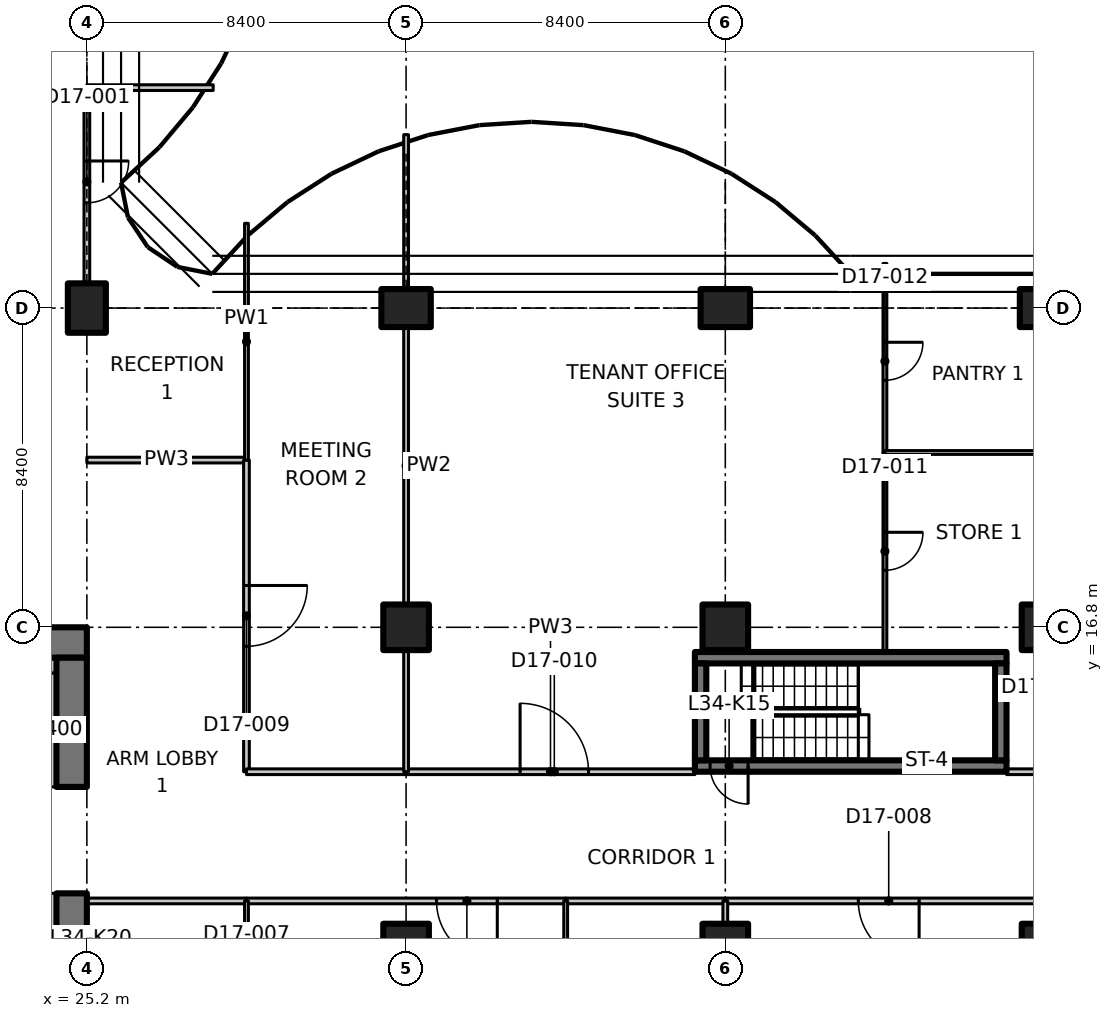
"""IFC4 building model, lengths in metres.
Left out: names, types, materials, properties, quantities, classifications, styles, units other than length and angle.
Written with IfcOpenShell. Run it as: python <this file> out.ifc"""

import sys

from ifc_helpers import new_model, si_unit, direction, frame, frame_2d, origin, origin_2d, place, context, subcontext, project, spatial, polyline, rectangle, outline, extrude, element, fill, save


model = new_model("IFC4")
c1 = context("Model", 3, precision=1e-05, world=origin(), true_north=direction((0.0, 1.0)))
c2 = subcontext(c1, "Body", "Model", "MODEL_VIEW")
j1 = project(units=[si_unit("LENGTHUNIT", "METRE"), si_unit("PLANEANGLEUNIT", "RADIAN")], contexts=[c1])
p1 = place(None, origin())
s1 = spatial("IfcSite", under=j1, at=p1, CompositionType="ELEMENT")
p2 = place(p1, origin())
s2 = spatial("IfcBuilding", under=s1, at=p2, CompositionType="ELEMENT")
p3 = place(p2, frame((0.0, 0.0, 138.5)))
s3 = spatial("IfcBuildingStorey", under=s2, at=p3, CompositionType="ELEMENT", Elevation=138.5)
p4 = place(p3, frame((25.2, 25.2, 0.0), z_axis=(0.0, 0.0, 1.0), x_axis=(1.0, 0.0, 0.0)))
e1 = element("IfcColumn", 1, at=p4, inside=s3, PredefinedType="COLUMN", context=c2, shape_type="SweptSolid", body=[
    extrude(rectangle(XDim=1.0, YDim=1.3, at=origin_2d()), origin(), (0.0, 0.0, 1.0), 3.35),
])
for number, where, z_axis, x_axis in (
    (2, (33.6, 8.4, 0.0), (0.0, 0.0, 1.0), (1.0, 0.0, 0.0)),
    (3, (33.6, 16.8, 0.0), (0.0, 0.0, 1.0), (1.0, 0.0, 0.0)),
):
    element("IfcColumn", number, at=place(p3, frame(where, z_axis=z_axis, x_axis=x_axis)), inside=s3, PredefinedType="COLUMN", context=c2, shape_type="SweptSolid", body=[
        extrude(rectangle(XDim=1.2, YDim=1.2, at=origin_2d()), origin(), (0.0, 0.0, 1.0), 3.35),
    ])
p5 = place(p3, frame((33.6, 25.2, 0.0), z_axis=(0.0, 0.0, 1.0), x_axis=(0.0, 1.0, 0.0)))
e4 = element("IfcColumn", 4, at=p5, inside=s3, PredefinedType="COLUMN", context=c2, shape_type="SweptSolid", body=[
    extrude(rectangle(XDim=1.0, YDim=1.3, at=origin_2d()), origin(), (0.0, 0.0, 1.0), 3.35),
])
for number, where, z_axis, x_axis in (
    (5, (42.0, 8.4, 0.0), (0.0, 0.0, 1.0), (1.0, 0.0, 0.0)),
    (6, (42.0, 16.8, 0.0), (0.0, 0.0, 1.0), (1.0, 0.0, 0.0)),
):
    element("IfcColumn", number, at=place(p3, frame(where, z_axis=z_axis, x_axis=x_axis)), inside=s3, PredefinedType="COLUMN", context=c2, shape_type="SweptSolid", body=[
        extrude(rectangle(XDim=1.2, YDim=1.2, at=origin_2d()), origin(), (0.0, 0.0, 1.0), 3.35),
    ])
p6 = place(p3, frame((42.0, 25.2, 0.0), z_axis=(0.0, 0.0, 1.0), x_axis=(0.0, 1.0, 0.0)))
e7 = element("IfcColumn", 7, at=p6, inside=s3, PredefinedType="COLUMN", context=c2, shape_type="SweptSolid", body=[
    extrude(rectangle(XDim=1.0, YDim=1.3, at=origin_2d()), origin(), (0.0, 0.0, 1.0), 3.35),
])
for number, where, z_axis, x_axis in (
    (8, (50.4, 8.4, 0.0), (0.0, 0.0, 1.0), (1.0, 0.0, 0.0)),
    (9, (50.4, 16.8, 0.0), (0.0, 0.0, 1.0), (1.0, 0.0, 0.0)),
):
    element("IfcColumn", number, at=place(p3, frame(where, z_axis=z_axis, x_axis=x_axis)), inside=s3, PredefinedType="COLUMN", context=c2, shape_type="SweptSolid", body=[
        extrude(rectangle(XDim=1.2, YDim=1.2, at=origin_2d()), origin(), (0.0, 0.0, 1.0), 3.35),
    ])
p7 = place(p3, frame((50.4, 25.2, 0.0), z_axis=(0.0, 0.0, 1.0), x_axis=(0.0, 1.0, 0.0)))
e10 = element("IfcColumn", 10, at=p7, inside=s3, PredefinedType="COLUMN", context=c2, shape_type="SweptSolid", body=[
    extrude(rectangle(XDim=1.0, YDim=1.3, at=origin_2d()), origin(), (0.0, 0.0, 1.0), 3.35),
])
p8 = place(p3, frame((23.8, 16.4, 0.0), z_axis=(0.0, 0.0, 1.0), x_axis=(1.0, 0.0, 0.0)))
e11 = element("IfcWall", 11, at=p8, inside=s3, PredefinedType="SHEAR", context=c2, shape_type="SweptSolid", body=[
    extrude(rectangle(XDim=1.4, YDim=0.8, at=frame_2d((0.7, 0.0))), origin(), (0.0, 0.0, 1.0), 3.35),
])
p9 = place(p3, frame((24.8, 0.8, 0.0), z_axis=(0.0, 0.0, 1.0), x_axis=(0.0, 1.0, 0.0)))
e12 = element("IfcWall", 12, at=p9, inside=s3, PredefinedType="SHEAR", context=c2, shape_type="SweptSolid", body=[
    extrude(rectangle(XDim=9.0, YDim=0.8, at=frame_2d((4.5, 0.0))), origin(), (0.0, 0.0, 1.0), 3.35),
])
p10 = place(p3, frame((24.8, 12.6, 0.0), z_axis=(0.0, 0.0, 1.0), x_axis=(0.0, 1.0, 0.0)))
e13 = element("IfcWall", 13, at=p10, inside=s3, PredefinedType="SHEAR", context=c2, shape_type="SweptSolid", body=[
    extrude(rectangle(XDim=3.4, YDim=0.8, at=frame_2d((1.7, 0.0))), origin(), (0.0, 0.0, 1.0), 3.35),
])
p11 = place(p3, frame((24.2, 12.6, 0.0), z_axis=(0.0, 0.0, 1.0), x_axis=(0.0, 1.0, 0.0)))
e14 = element("IfcWall", 14, at=p11, inside=s3, PredefinedType="PARTITIONING", context=c2, shape_type="SweptSolid", body=[
    extrude(rectangle(XDim=3.0, YDim=0.4, at=frame_2d((1.5, 0.0))), origin(), (0.0, 0.0, 1.0), 3.35),
])
p12 = place(p3, frame((23.8, 15.8, 0.0), z_axis=(0.0, 0.0, 1.0), x_axis=(1.0, 0.0, 0.0)))
e15 = element("IfcWall", 15, at=p12, inside=s3, PredefinedType="PARTITIONING", context=c2, shape_type="SweptSolid", body=[
    extrude(rectangle(XDim=0.6, YDim=0.4, at=frame_2d((0.3, 0.0))), origin(), (0.0, 0.0, 1.0), 3.35),
])
p13 = place(p3, frame((49.4, 13.15, 0.0), z_axis=(0.0, 0.0, 1.0), x_axis=(-1.0, 0.0, 0.0)))
e16 = element("IfcWall", 16, at=p13, inside=s3, PredefinedType="SHEAR", context=c2, shape_type="SweptSolid", body=[
    extrude(rectangle(XDim=8.2, YDim=0.3, at=frame_2d((4.1, 0.0))), origin(), (0.0, 0.0, 1.0), 3.35),
])
p14 = place(p13, frame((6.8, 0.0, 0.0)))
e17 = element("IfcOpeningElement", 17, at=p14, cuts=e16, PredefinedType="OPENING", context=c2, shape_type="SweptSolid", body=[
    extrude(rectangle(XDim=1.0, YDim=2.1, at=frame_2d((0.5, 1.05))), frame((0.0, 0.16, 0.0), z_axis=(0.0, -1.0, 0.0), x_axis=(1.0, 0.0, 0.0)), (0.0, 0.0, 1.0), 0.32),
])
p15 = place(p3, frame((41.2, 16.0, 0.0), z_axis=(0.0, 0.0, 1.0), x_axis=(1.0, 0.0, 0.0)))
e18 = element("IfcWall", 18, at=p15, inside=s3, PredefinedType="SHEAR", context=c2, shape_type="SweptSolid", body=[
    extrude(rectangle(XDim=8.2, YDim=0.3, at=frame_2d((4.1, 0.0))), origin(), (0.0, 0.0, 1.0), 3.35),
])
for number, where, z_axis, x_axis in (
    (19, (41.35, 13.3, 0.0), (0.0, 0.0, 1.0), (0.0, 1.0, 0.0)),
    (20, (49.25, 13.3, 0.0), (0.0, 0.0, 1.0), (0.0, 1.0, 0.0)),
):
    element("IfcWall", number, at=place(p3, frame(where, z_axis=z_axis, x_axis=x_axis)), inside=s3, PredefinedType="SHEAR", context=c2, shape_type="SweptSolid", body=[
        extrude(rectangle(XDim=2.55, YDim=0.3, at=frame_2d((1.275, 0.0))), origin(), (0.0, 0.0, 1.0), 3.35),
    ])
p16 = place(p3, frame((24.2, 4.35, 0.0), z_axis=(0.0, 0.0, 1.0), x_axis=(0.0, 1.0, 0.0)))
e21 = element("IfcWall", 21, at=p16, inside=s3, PredefinedType="PARTITIONING", context=c2, shape_type="SweptSolid", body=[
    extrude(rectangle(XDim=5.45, YDim=0.4, at=frame_2d((2.725, 0.0))), origin(), (0.0, 0.0, 1.0), 3.35),
])
for number, where, z_axis, x_axis in (
    (22, (25.2, 21.2, 0.0), (0.0, 0.0, 1.0), (1.0, 0.0, 0.0)),
    (23, (29.4, 9.6, 0.0), (0.0, 0.0, 1.0), (-1.0, 0.0, 0.0)),
):
    element("IfcWall", number, at=place(p3, frame(where, z_axis=z_axis, x_axis=x_axis)), inside=s3, PredefinedType="PARTITIONING", context=c2, shape_type="SweptSolid", body=[
        extrude(rectangle(XDim=4.2, YDim=0.15, at=frame_2d((2.1, 0.0))), origin(), (0.0, 0.0, 1.0), 3.33),
    ])
p17 = place(p3, frame((29.4, 21.2, 0.0), z_axis=(0.0, 0.0, 1.0), x_axis=(0.0, -1.0, 0.0)))
e24 = element("IfcWall", 24, at=p17, inside=s3, PredefinedType="PARTITIONING", context=c2, shape_type="SweptSolid", body=[
    extrude(rectangle(XDim=8.2, YDim=0.15, at=frame_2d((4.1, 0.0))), origin(), (0.0, 0.0, 1.0), 3.33),
])
p18 = place(p17, frame((3.3, 0.0, 0.0)))
e25 = element("IfcOpeningElement", 25, at=p18, cuts=e24, PredefinedType="OPENING", context=c2, shape_type="SweptSolid", body=[
    extrude(rectangle(XDim=1.6, YDim=2.1, at=frame_2d((0.8, 1.05))), frame((0.0, 0.085, 0.0), z_axis=(0.0, -1.0, 0.0), x_axis=(1.0, 0.0, 0.0)), (0.0, 0.0, 1.0), 0.17),
])
p19 = place(p3, frame((29.4, 27.429, 0.0), z_axis=(0.0, 0.0, 1.0), x_axis=(0.0, -1.0, 0.0)))
e26 = element("IfcWall", 26, at=p19, inside=s3, PredefinedType="PARTITIONING", context=c2, shape_type="SweptSolid", body=[
    extrude(outline(polyline([(0.0, 0.0), (6.229, 0.0), (6.229, 3.33), (2.679, 3.33), (2.677, 2.98), (1.781, 2.98), (1.779, 3.33), (0.154, 3.33), (0.0, 3.33), (0.0, 0.0)])), frame((0.0, 0.05, 0.0), z_axis=(0.0, -1.0, 0.0), x_axis=(1.0, 0.0, 0.0)), (0.0, 0.0, 1.0), 0.1),
])
p20 = place(p3, frame((25.2, 31.0, 0.0), z_axis=(0.0, 0.0, 1.0), x_axis=(0.0, -1.0, 0.0)))
e27 = element("IfcWall", 27, at=p20, inside=s3, PredefinedType="PARTITIONING", context=c2, shape_type="SweptSolid", body=[
    extrude(outline(polyline([(0.0, 0.0), (5.13, 0.0), (5.13, 2.98), (0.0, 2.98), (0.0, 0.0)])), frame((0.0, 0.075, 0.0), z_axis=(0.0, -1.0, 0.0), x_axis=(1.0, 0.0, 0.0)), (0.0, 0.0, 1.0), 0.15),
])
p21 = place(p20, frame((1.93, 0.0, 0.0)))
e28 = element("IfcOpeningElement", 28, at=p21, cuts=e27, PredefinedType="OPENING", context=c2, shape_type="SweptSolid", body=[
    extrude(rectangle(XDim=1.1, YDim=2.1, at=frame_2d((0.55, 1.05))), frame((0.0, 0.085, 0.0), z_axis=(0.0, -1.0, 0.0), x_axis=(1.0, 0.0, 0.0)), (0.0, 0.0, 1.0), 0.17),
])
p22 = place(p3, frame((25.2, 31.0, 0.0), z_axis=(0.0, 0.0, 1.0), x_axis=(1.0, 0.0, 0.0)))
e29 = element("IfcWall", 29, at=p22, inside=s3, PredefinedType="PARTITIONING", context=c2, shape_type="SweptSolid", body=[
    extrude(rectangle(XDim=3.324, YDim=0.15, at=frame_2d((1.662, 0.0))), origin(), (0.0, 0.0, 1.0), 2.98),
])
p23 = place(p3, frame((37.8, 9.6, 0.0), z_axis=(0.0, 0.0, 1.0), x_axis=(-1.0, 0.0, 0.0)))
e30 = element("IfcWall", 30, at=p23, inside=s3, PredefinedType="PARTITIONING", context=c2, shape_type="SweptSolid", body=[
    extrude(rectangle(XDim=8.4, YDim=0.15, at=frame_2d((4.2, 0.0))), origin(), (0.0, 0.0, 1.0), 3.33),
])
p24 = place(p23, frame((1.8, 0.0, 0.0)))
e31 = element("IfcOpeningElement", 31, at=p24, cuts=e30, PredefinedType="OPENING", context=c2, shape_type="SweptSolid", body=[
    extrude(rectangle(XDim=1.6, YDim=2.1, at=frame_2d((0.8, 1.05))), frame((0.0, 0.085, 0.0), z_axis=(0.0, -1.0, 0.0), x_axis=(1.0, 0.0, 0.0)), (0.0, 0.0, 1.0), 0.17),
])
p25 = place(p3, frame((42.0, 9.6, 0.0), z_axis=(0.0, 0.0, 1.0), x_axis=(-1.0, 0.0, 0.0)))
e32 = element("IfcWall", 32, at=p25, inside=s3, PredefinedType="PARTITIONING", context=c2, shape_type="SweptSolid", body=[
    extrude(rectangle(XDim=4.2, YDim=0.15, at=frame_2d((2.1, 0.0))), origin(), (0.0, 0.0, 1.0), 3.33),
])
p26 = place(p3, frame((50.4, 9.6, 0.0), z_axis=(0.0, 0.0, 1.0), x_axis=(-1.0, 0.0, 0.0)))
e33 = element("IfcWall", 33, at=p26, inside=s3, PredefinedType="PARTITIONING", context=c2, shape_type="SweptSolid", body=[
    extrude(rectangle(XDim=8.4, YDim=0.15, at=frame_2d((4.2, 0.0))), origin(), (0.0, 0.0, 1.0), 3.33),
])
p27 = place(p26, frame((3.3, 0.0, 0.0)))
e34 = element("IfcOpeningElement", 34, at=p27, cuts=e33, PredefinedType="OPENING", context=c2, shape_type="SweptSolid", body=[
    extrude(rectangle(XDim=1.6, YDim=2.1, at=frame_2d((0.8, 1.05))), frame((0.0, 0.085, 0.0), z_axis=(0.0, -1.0, 0.0), x_axis=(1.0, 0.0, 0.0)), (0.0, 0.0, 1.0), 0.17),
])
p28 = place(p3, frame((29.4, 13.0, 0.0), z_axis=(0.0, 0.0, 1.0), x_axis=(1.0, 0.0, 0.0)))
e35 = element("IfcWall", 35, at=p28, inside=s3, PredefinedType="PARTITIONING", context=c2, shape_type="SweptSolid", body=[
    extrude(rectangle(XDim=4.2, YDim=0.15, at=frame_2d((2.1, 0.0))), origin(), (0.0, 0.0, 1.0), 3.33),
])
p29 = place(p3, frame((33.6, 13.0, 0.0), z_axis=(0.0, 0.0, 1.0), x_axis=(1.0, 0.0, 0.0)))
e36 = element("IfcWall", 36, at=p29, inside=s3, PredefinedType="PARTITIONING", context=c2, shape_type="SweptSolid", body=[
    extrude(rectangle(XDim=7.6, YDim=0.15, at=frame_2d((3.8, 0.0))), origin(), (0.0, 0.0, 1.0), 3.33),
])
p30 = place(p29, frame((3.0, 0.0, 0.0)))
e37 = element("IfcOpeningElement", 37, at=p30, cuts=e36, PredefinedType="OPENING", context=c2, shape_type="SweptSolid", body=[
    extrude(rectangle(XDim=1.8, YDim=2.1, at=frame_2d((0.9, 1.05))), frame((0.0, 0.085, 0.0), z_axis=(0.0, -1.0, 0.0), x_axis=(1.0, 0.0, 0.0)), (0.0, 0.0, 1.0), 0.17),
])
p31 = place(p3, frame((49.4, 13.0, 0.0), z_axis=(0.0, 0.0, 1.0), x_axis=(1.0, 0.0, 0.0)))
e38 = element("IfcWall", 38, at=p31, inside=s3, PredefinedType="PARTITIONING", context=c2, shape_type="SweptSolid", body=[
    extrude(rectangle(XDim=1.0, YDim=0.15, at=frame_2d((0.5, 0.0))), origin(), (0.0, 0.0, 1.0), 3.33),
])
p32 = place(p3, frame((37.8, 9.6, 0.0), z_axis=(0.0, 0.0, 1.0), x_axis=(0.0, -1.0, 0.0)))
e39 = element("IfcWall", 39, at=p32, inside=s3, PredefinedType="PARTITIONING", context=c2, shape_type="SweptSolid", body=[
    extrude(rectangle(XDim=7.2, YDim=0.1, at=frame_2d((3.6, 0.0))), origin(), (0.0, 0.0, 1.0), 3.33),
])
p33 = place(p32, frame((3.0, 0.0, 0.0)))
e40 = element("IfcOpeningElement", 40, at=p33, cuts=e39, PredefinedType="OPENING", context=c2, shape_type="SweptSolid", body=[
    extrude(rectangle(XDim=1.0, YDim=2.1, at=frame_2d((0.5, 1.05))), frame((0.0, 0.06, 0.0), z_axis=(0.0, -1.0, 0.0), x_axis=(1.0, 0.0, 0.0)), (0.0, 0.0, 1.0), 0.12),
])
p34 = place(p3, frame((29.4, 3.6, 0.0), z_axis=(0.0, 0.0, 1.0), x_axis=(0.0, 1.0, 0.0)))
e41 = element("IfcWall", 41, at=p34, inside=s3, PredefinedType="PARTITIONING", context=c2, shape_type="SweptSolid", body=[
    extrude(rectangle(XDim=6.0, YDim=0.1, at=frame_2d((3.0, 0.0))), origin(), (0.0, 0.0, 1.0), 3.33),
])
p35 = place(p34, frame((2.4, 0.0, 0.0)))
e42 = element("IfcOpeningElement", 42, at=p35, cuts=e41, PredefinedType="OPENING", context=c2, shape_type="SweptSolid", body=[
    extrude(rectangle(XDim=1.0, YDim=2.1, at=frame_2d((0.5, 1.05))), frame((0.0, 0.06, 0.0), z_axis=(0.0, -1.0, 0.0), x_axis=(1.0, 0.0, 0.0)), (0.0, 0.0, 1.0), 0.12),
])
p36 = place(p3, frame((42.0, 9.6, 0.0), z_axis=(0.0, 0.0, 1.0), x_axis=(0.0, -1.0, 0.0)))
e43 = element("IfcWall", 43, at=p36, inside=s3, PredefinedType="PARTITIONING", context=c2, shape_type="SweptSolid", body=[
    extrude(rectangle(XDim=0.58, YDim=0.125, at=frame_2d((0.29, 0.0))), origin(), (0.0, 0.0, 1.0), 3.33),
])
p37 = place(p3, frame((33.6, 29.762, 0.0), z_axis=(0.0, 0.0, 1.0), x_axis=(0.0, -1.0, 0.0)))
e44 = element("IfcWall", 44, at=p37, inside=s3, PredefinedType="PARTITIONING", context=c2, shape_type="SweptSolid", body=[
    extrude(rectangle(XDim=4.042, YDim=0.125, at=frame_2d((2.021, 0.0))), origin(), (0.0, 0.0, 1.0), 2.98),
])
p38 = place(p3, frame((33.6, 24.68, 0.0), z_axis=(0.0, 0.0, 1.0), x_axis=(0.0, -1.0, 0.0)))
e45 = element("IfcWall", 45, at=p38, inside=s3, PredefinedType="PARTITIONING", context=c2, shape_type="SweptSolid", body=[
    extrude(rectangle(XDim=7.26, YDim=0.125, at=frame_2d((3.63, 0.0))), origin(), (0.0, 0.0, 1.0), 3.33),
])
p39 = place(p3, frame((33.6, 16.18, 0.0), z_axis=(0.0, 0.0, 1.0), x_axis=(0.0, -1.0, 0.0)))
e46 = element("IfcWall", 46, at=p39, inside=s3, PredefinedType="PARTITIONING", context=c2, shape_type="SweptSolid", body=[
    extrude(rectangle(XDim=3.18, YDim=0.125, at=frame_2d((1.59, 0.0))), origin(), (0.0, 0.0, 1.0), 3.33),
])
p40 = place(p3, frame((46.2, 21.4, 0.0), z_axis=(0.0, 0.0, 1.0), x_axis=(0.0, -1.0, 0.0)))
e47 = element("IfcWall", 47, at=p40, inside=s3, PredefinedType="PARTITIONING", context=c2, shape_type="SweptSolid", body=[
    extrude(rectangle(XDim=5.25, YDim=0.1, at=frame_2d((2.625, 0.0))), origin(), (0.0, 0.0, 1.0), 3.33),
])
p41 = place(p40, frame((2.1, 0.0, 0.0)))
e48 = element("IfcOpeningElement", 48, at=p41, cuts=e47, PredefinedType="OPENING", context=c2, shape_type="SweptSolid", body=[
    extrude(rectangle(XDim=1.0, YDim=2.1, at=frame_2d((0.5, 1.05))), frame((0.0, 0.06, 0.0), z_axis=(0.0, -1.0, 0.0), x_axis=(1.0, 0.0, 0.0)), (0.0, 0.0, 1.0), 0.12),
])
p42 = place(p3, frame((46.2, 26.374, 0.0), z_axis=(0.0, 0.0, 1.0), x_axis=(0.0, -1.0, 0.0)))
e49 = element("IfcWall", 49, at=p42, inside=s3, PredefinedType="PARTITIONING", context=c2, shape_type="SweptSolid", body=[
    extrude(outline(polyline([(0.0, 0.0), (4.974, 0.0), (4.974, 3.33), (1.624, 3.33), (1.622, 2.98), (0.726, 2.98), (0.724, 3.33), (0.074, 3.33), (0.0, 3.33), (0.0, 0.0)])), frame((0.0, 0.05, 0.0), z_axis=(0.0, -1.0, 0.0), x_axis=(1.0, 0.0, 0.0)), (0.0, 0.0, 1.0), 0.1),
])
p43 = place(p42, frame((2.074, 0.0, 0.0)))
e50 = element("IfcOpeningElement", 50, at=p43, cuts=e49, PredefinedType="OPENING", context=c2, shape_type="SweptSolid", body=[
    extrude(rectangle(XDim=1.0, YDim=2.1, at=frame_2d((0.5, 1.05))), frame((0.0, 0.06, 0.0), z_axis=(0.0, -1.0, 0.0), x_axis=(1.0, 0.0, 0.0)), (0.0, 0.0, 1.0), 0.12),
])
p44 = place(p3, frame((46.2, 21.4, 0.0), z_axis=(0.0, 0.0, 1.0), x_axis=(1.0, 0.0, 0.0)))
e51 = element("IfcWall", 51, at=p44, inside=s3, PredefinedType="PARTITIONING", context=c2, shape_type="SweptSolid", body=[
    extrude(rectangle(XDim=4.2, YDim=0.1, at=frame_2d((2.1, 0.0))), origin(), (0.0, 0.0, 1.0), 3.33),
])
p45 = place(p14, origin())
e52 = element("IfcDoor", 52, at=p45, inside=s3, OperationType="SINGLE_SWING_LEFT", PredefinedType="DOOR", context=c2, shape_type="SweptSolid", body=[
    extrude(rectangle(XDim=1.0, YDim=2.1, at=frame_2d((0.5, 1.05))), frame((0.0, 0.025, 0.0), z_axis=(0.0, -1.0, 0.0), x_axis=(1.0, 0.0, 0.0)), (0.0, 0.0, 1.0), 0.05),
])
fill(e17, e52)
p46 = place(p21, origin())
e53 = element("IfcDoor", 53, at=p46, inside=s3, OperationType="SINGLE_SWING_RIGHT", PredefinedType="DOOR", context=c2, shape_type="SweptSolid", body=[
    extrude(rectangle(XDim=1.1, YDim=2.1, at=frame_2d((0.55, 1.05))), frame((0.0, 0.025, 0.0), z_axis=(0.0, -1.0, 0.0), x_axis=(1.0, 0.0, 0.0)), (0.0, 0.0, 1.0), 0.05),
])
fill(e28, e53)
p47 = place(p24, origin())
e54 = element("IfcDoor", 54, at=p47, inside=s3, OperationType="DOUBLE_DOOR_SINGLE_SWING", PredefinedType="DOOR", context=c2, shape_type="SweptSolid", body=[
    extrude(rectangle(XDim=1.6, YDim=2.1, at=frame_2d((0.8, 1.05))), frame((0.0, 0.025, 0.0), z_axis=(0.0, -1.0, 0.0), x_axis=(1.0, 0.0, 0.0)), (0.0, 0.0, 1.0), 0.05),
])
fill(e31, e54)
p48 = place(p27, origin())
e55 = element("IfcDoor", 55, at=p48, inside=s3, OperationType="DOUBLE_DOOR_SINGLE_SWING", PredefinedType="DOOR", context=c2, shape_type="SweptSolid", body=[
    extrude(rectangle(XDim=1.6, YDim=2.1, at=frame_2d((0.8, 1.05))), frame((0.0, 0.025, 0.0), z_axis=(0.0, -1.0, 0.0), x_axis=(1.0, 0.0, 0.0)), (0.0, 0.0, 1.0), 0.05),
])
fill(e34, e55)
p49 = place(p18, origin())
e56 = element("IfcDoor", 56, at=p49, inside=s3, OperationType="DOUBLE_DOOR_SINGLE_SWING", PredefinedType="DOOR", context=c2, shape_type="SweptSolid", body=[
    extrude(rectangle(XDim=1.6, YDim=2.1, at=frame_2d((0.8, 1.05))), frame((0.0, 0.025, 0.0), z_axis=(0.0, -1.0, 0.0), x_axis=(1.0, 0.0, 0.0)), (0.0, 0.0, 1.0), 0.05),
])
fill(e25, e56)
p50 = place(p30, origin())
e57 = element("IfcDoor", 57, at=p50, inside=s3, OperationType="DOUBLE_DOOR_SINGLE_SWING", PredefinedType="DOOR", context=c2, shape_type="SweptSolid", body=[
    extrude(rectangle(XDim=1.8, YDim=2.1, at=frame_2d((0.9, 1.05))), frame((0.0, 0.025, 0.0), z_axis=(0.0, -1.0, 0.0), x_axis=(1.0, 0.0, 0.0)), (0.0, 0.0, 1.0), 0.05),
])
fill(e37, e57)
p51 = place(p41, origin())
e58 = element("IfcDoor", 58, at=p51, inside=s3, OperationType="SINGLE_SWING_LEFT", PredefinedType="DOOR", context=c2, shape_type="SweptSolid", body=[
    extrude(rectangle(XDim=1.0, YDim=2.1, at=frame_2d((0.5, 1.05))), frame((0.0, 0.025, 0.0), z_axis=(0.0, -1.0, 0.0), x_axis=(1.0, 0.0, 0.0)), (0.0, 0.0, 1.0), 0.05),
])
fill(e48, e58)
p52 = place(p43, origin())
e59 = element("IfcDoor", 59, at=p52, inside=s3, OperationType="SINGLE_SWING_LEFT", PredefinedType="DOOR", context=c2, shape_type="SweptSolid", body=[
    extrude(rectangle(XDim=1.0, YDim=2.1, at=frame_2d((0.5, 1.05))), frame((0.0, 0.025, 0.0), z_axis=(0.0, -1.0, 0.0), x_axis=(1.0, 0.0, 0.0)), (0.0, 0.0, 1.0), 0.05),
])
fill(e50, e59)
save(model, sys.argv[1])
